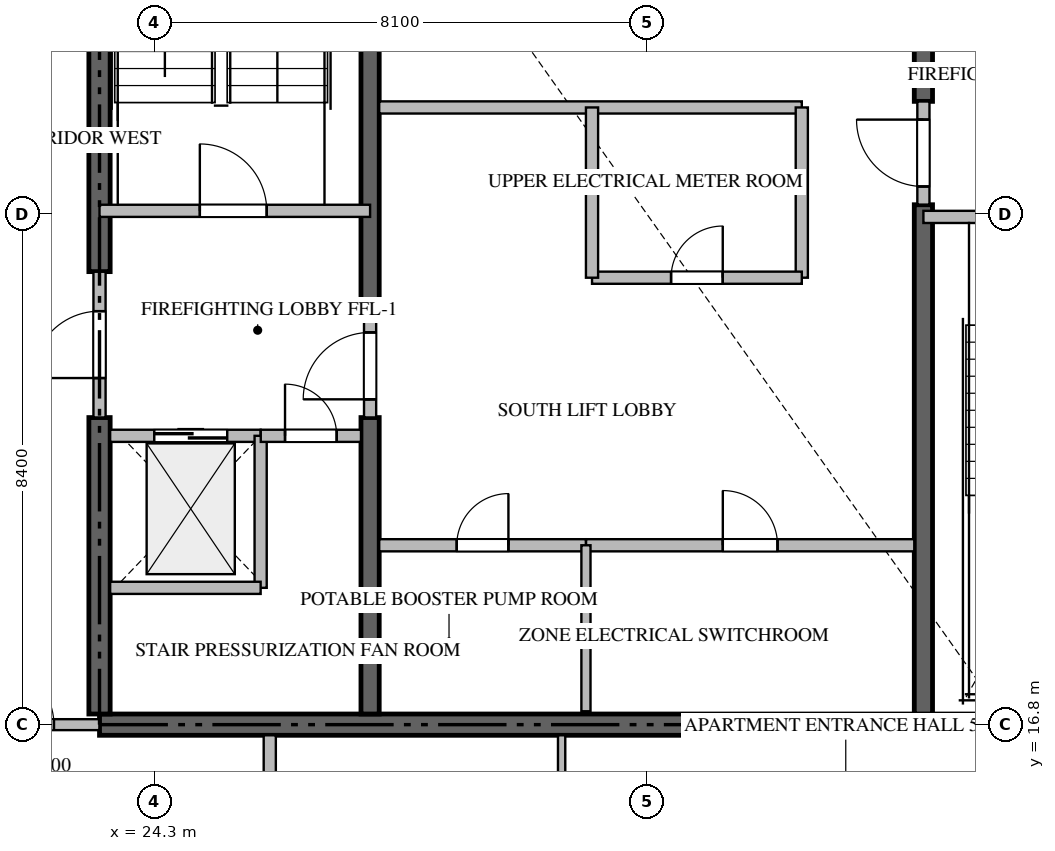
"""IFC4 building model, lengths in metres.
Left out: names, types, materials, properties, quantities, classifications, styles, units other than length and angle.
Written with IfcOpenShell. Run it as: python <this file> out.ifc"""

import sys

from ifc_helpers import new_model, si_unit, direction, frame, frame_2d, origin, place, context, subcontext, project, spatial, rectangle, extrude, source, transform, mapped, element, fill, save


model = new_model("IFC4")
c1 = context("Model", 3, precision=1e-05, world=origin(), true_north=direction((0.0, 1.0)))
c2 = subcontext(c1, "Body", "Model", "MODEL_VIEW")
j1 = project(units=[si_unit("LENGTHUNIT", "METRE"), si_unit("PLANEANGLEUNIT", "RADIAN")], contexts=[c1])
p1 = place(None, origin())
s1 = spatial("IfcSite", under=j1, at=p1, CompositionType="ELEMENT")
p2 = place(p1, origin())
s2 = spatial("IfcBuilding", under=s1, at=p2, CompositionType="ELEMENT")
p3 = place(p2, frame((0.0, 0.0, 222.0)))
s3 = spatial("IfcBuildingStorey", under=s2, at=p3, CompositionType="ELEMENT", Elevation=222.0)
p4 = place(p3, frame((23.4, 16.8, -0.26), z_axis=(0.0, 0.0, 1.0), x_axis=(1.0, 0.0, 0.0)))
e1 = element("IfcWall", 1, at=p4, inside=s3, PredefinedType="SHEAR", context=c2, shape_type="SweptSolid", body=[
    extrude(rectangle(XDim=18.0, YDim=0.35, at=frame_2d((9.0, 0.0))), origin(), (0.0, 0.0, 1.0), 3.848),
])
p5 = place(p3, frame((23.4, 16.975, -0.26), z_axis=(0.0, 0.0, 1.0), x_axis=(0.0, 1.0, 0.0)))
e2 = element("IfcWall", 2, at=p5, inside=s3, PredefinedType="SHEAR", context=c2, shape_type="SweptSolid", body=[
    extrude(rectangle(XDim=4.875, YDim=0.35, at=frame_2d((2.438, 0.0))), origin(), (0.0, 0.0, 1.0), 3.848),
])
p6 = place(p3, frame((23.4, 24.25, -0.26), z_axis=(0.0, 0.0, 1.0), x_axis=(0.0, 1.0, 0.0)))
e3 = element("IfcWall", 3, at=p6, inside=s3, PredefinedType="SHEAR", context=c2, shape_type="SweptSolid", body=[
    extrude(rectangle(XDim=9.175, YDim=0.35, at=frame_2d((4.587, 0.0))), origin(), (0.0, 0.0, 1.0), 3.848),
])
p7 = place(p3, frame((27.85, 16.975, -0.26), z_axis=(0.0, 0.0, 1.0), x_axis=(0.0, 1.0, 0.0)))
e4 = element("IfcWall", 4, at=p7, inside=s3, PredefinedType="SHEAR", context=c2, shape_type="SweptSolid", body=[
    extrude(rectangle(XDim=4.875, YDim=0.3, at=frame_2d((2.438, 0.0))), origin(), (0.0, 0.0, 1.0), 3.848),
])
p8 = place(p3, frame((27.85, 23.55, -0.26), z_axis=(0.0, 0.0, 1.0), x_axis=(0.0, 1.0, 0.0)))
e5 = element("IfcWall", 5, at=p8, inside=s3, PredefinedType="SHEAR", context=c2, shape_type="SweptSolid", body=[
    extrude(rectangle(XDim=9.875, YDim=0.3, at=frame_2d((4.938, 0.0))), origin(), (0.0, 0.0, 1.0), 3.848),
])
p9 = place(p3, frame((36.95, 16.975, -0.26), z_axis=(0.0, 0.0, 1.0), x_axis=(0.0, 1.0, 0.0)))
e6 = element("IfcWall", 6, at=p9, inside=s3, PredefinedType="SHEAR", context=c2, shape_type="SweptSolid", body=[
    extrude(rectangle(XDim=8.375, YDim=0.3, at=frame_2d((4.188, 0.0))), origin(), (0.0, 0.0, 1.0), 3.848),
])
p10 = place(p3, frame((36.95, 27.05, -0.26), z_axis=(0.0, 0.0, 1.0), x_axis=(0.0, 1.0, 0.0)))
e7 = element("IfcWall", 7, at=p10, inside=s3, PredefinedType="SHEAR", context=c2, shape_type="SweptSolid", body=[
    extrude(rectangle(XDim=6.375, YDim=0.3, at=frame_2d((3.188, 0.0))), origin(), (0.0, 0.0, 1.0), 3.848),
])
p11 = place(p3, frame((23.4, 25.25, 0.0), z_axis=(0.0, 0.0, 1.0), x_axis=(1.0, 0.0, 0.0)))
e8 = element("IfcWall", 8, at=p11, inside=s3, PredefinedType="STANDARD", context=c2, shape_type="SweptSolid", body=[
    extrude(rectangle(XDim=4.45, YDim=0.2, at=frame_2d((2.225, 0.0))), origin(), (0.0, 0.0, 1.0), 3.59),
])
p12 = place(p11, frame((1.65, 0.0, 0.0)))
e9 = element("IfcOpeningElement", 9, at=p12, cuts=e8, PredefinedType="OPENING", context=c2, shape_type="SweptSolid", body=[
    extrude(rectangle(XDim=1.1, YDim=2.15, at=frame_2d((0.55, 1.075))), frame((0.0, 0.11, 0.0), z_axis=(0.0, -1.0, 0.0), x_axis=(1.0, 0.0, 0.0)), (0.0, 0.0, 1.0), 0.22),
])
p13 = place(p3, frame((36.95, 25.15, 0.0), z_axis=(0.0, 0.0, 1.0), x_axis=(1.0, 0.0, 0.0)))
e10 = element("IfcWall", 10, at=p13, inside=s3, PredefinedType="STANDARD", context=c2, shape_type="SweptSolid", body=[
    extrude(rectangle(XDim=4.45, YDim=0.2, at=frame_2d((2.225, 0.0))), origin(), (0.0, 0.0, 1.0), 3.59),
])
p14 = place(p13, frame((1.65, 0.0, 0.0)))
e11 = element("IfcOpeningElement", 11, at=p14, cuts=e10, PredefinedType="OPENING", context=c2, shape_type="SweptSolid", body=[
    extrude(rectangle(XDim=1.1, YDim=2.15, at=frame_2d((0.55, 1.075))), frame((0.0, 0.11, 0.0), z_axis=(0.0, -1.0, 0.0), x_axis=(1.0, 0.0, 0.0)), (0.0, 0.0, 1.0), 0.22),
])
p15 = place(p3, frame((23.575, 21.55, 0.0), z_axis=(0.0, 0.0, 1.0), x_axis=(1.0, 0.0, 0.0)))
e12 = element("IfcWall", 12, at=p15, inside=s3, PredefinedType="STANDARD", context=c2, shape_type="SweptSolid", body=[
    extrude(rectangle(XDim=2.475, YDim=0.2, at=frame_2d((1.238, 0.0))), origin(), (0.0, 0.0, 1.0), 3.59),
])
p16 = place(p15, frame((0.725, 0.0, 0.0)))
e13 = element("IfcOpeningElement", 13, at=p16, cuts=e12, PredefinedType="OPENING", context=c2, shape_type="SweptSolid", body=[
    extrude(rectangle(XDim=1.2, YDim=2.2, at=frame_2d((0.6, 1.1))), frame((0.0, 0.11, 0.0), z_axis=(0.0, -1.0, 0.0), x_axis=(1.0, 0.0, 0.0)), (0.0, 0.0, 1.0), 0.22),
])
p17 = place(p3, frame((26.05, 19.05, 0.0), z_axis=(0.0, 0.0, 1.0), x_axis=(0.0, 1.0, 0.0)))
e14 = element("IfcWall", 14, at=p17, inside=s3, PredefinedType="STANDARD", context=c2, shape_type="SweptSolid", body=[
    extrude(rectangle(XDim=2.5, YDim=0.2, at=frame_2d((1.25, 0.0))), origin(), (0.0, 0.0, 1.0), 3.59),
])
p18 = place(p3, frame((23.575, 19.05, 0.0), z_axis=(0.0, 0.0, 1.0), x_axis=(1.0, 0.0, 0.0)))
e15 = element("IfcWall", 15, at=p18, inside=s3, PredefinedType="STANDARD", context=c2, shape_type="SweptSolid", body=[
    extrude(rectangle(XDim=2.475, YDim=0.2, at=frame_2d((1.238, 0.0))), origin(), (0.0, 0.0, 1.0), 3.59),
])
p19 = place(p3, frame((26.052, 21.55, 0.0), z_axis=(0.0, 0.0, 1.0), x_axis=(1.0, 0.0, 0.0)))
e16 = element("IfcWall", 16, at=p19, inside=s3, PredefinedType="STANDARD", context=c2, shape_type="SweptSolid", body=[
    extrude(rectangle(XDim=1.648, YDim=0.2, at=frame_2d((0.824, 0.0))), origin(), (0.0, 0.0, 1.0), 3.59),
])
p20 = place(p19, frame((0.399, 0.0, 0.0)))
e17 = element("IfcOpeningElement", 17, at=p20, cuts=e16, PredefinedType="OPENING", context=c2, shape_type="SweptSolid", body=[
    extrude(rectangle(XDim=0.85, YDim=2.1, at=frame_2d((0.425, 1.05))), frame((0.0, 0.11, 0.0), z_axis=(0.0, -1.0, 0.0), x_axis=(1.0, 0.0, 0.0)), (0.0, 0.0, 1.0), 0.22),
])
p21 = place(p3, frame((23.4, 21.852, 0.0), z_axis=(0.0, 0.0, 1.0), x_axis=(0.0, 1.0, 0.0)))
e18 = element("IfcWall", 18, at=p21, inside=s3, PredefinedType="STANDARD", context=c2, shape_type="SweptSolid", body=[
    extrude(rectangle(XDim=2.396, YDim=0.2, at=frame_2d((1.198, 0.0))), origin(), (0.0, 0.0, 1.0), 3.59),
])
p22 = place(p21, frame((0.648, 0.0, 0.0)))
e19 = element("IfcOpeningElement", 19, at=p22, cuts=e18, PredefinedType="OPENING", context=c2, shape_type="SweptSolid", body=[
    extrude(rectangle(XDim=1.1, YDim=2.15, at=frame_2d((0.55, 1.075))), frame((0.0, 0.11, 0.0), z_axis=(0.0, -1.0, 0.0), x_axis=(1.0, 0.0, 0.0)), (0.0, 0.0, 1.0), 0.22),
])
p23 = place(p3, frame((27.85, 21.852, 0.0), z_axis=(0.0, 0.0, 1.0), x_axis=(0.0, 1.0, 0.0)))
e20 = element("IfcWall", 20, at=p23, inside=s3, PredefinedType="STANDARD", context=c2, shape_type="SweptSolid", body=[
    extrude(rectangle(XDim=1.696, YDim=0.2, at=frame_2d((0.848, 0.0))), origin(), (0.0, 0.0, 1.0), 3.59),
])
p24 = place(p23, frame((0.298, 0.0, 0.0)))
e21 = element("IfcOpeningElement", 21, at=p24, cuts=e20, PredefinedType="OPENING", context=c2, shape_type="SweptSolid", body=[
    extrude(rectangle(XDim=1.1, YDim=2.15, at=frame_2d((0.55, 1.075))), frame((0.0, 0.11, 0.0), z_axis=(0.0, -1.0, 0.0), x_axis=(1.0, 0.0, 0.0)), (0.0, 0.0, 1.0), 0.22),
])
p25 = place(p3, frame((36.95, 25.352, 0.0), z_axis=(0.0, 0.0, 1.0), x_axis=(0.0, 1.0, 0.0)))
e22 = element("IfcWall", 22, at=p25, inside=s3, PredefinedType="STANDARD", context=c2, shape_type="SweptSolid", body=[
    extrude(rectangle(XDim=1.696, YDim=0.2, at=frame_2d((0.848, 0.0))), origin(), (0.0, 0.0, 1.0), 3.59),
])
p26 = place(p25, frame((0.298, 0.0, 0.0)))
e23 = element("IfcOpeningElement", 23, at=p26, cuts=e22, PredefinedType="OPENING", context=c2, shape_type="SweptSolid", body=[
    extrude(rectangle(XDim=1.1, YDim=2.15, at=frame_2d((0.55, 1.075))), frame((0.0, 0.11, 0.0), z_axis=(0.0, -1.0, 0.0), x_axis=(1.0, 0.0, 0.0)), (0.0, 0.0, 1.0), 0.22),
])
p27 = place(p3, frame((28.0, 19.75, 0.0), z_axis=(0.0, 0.0, 1.0), x_axis=(1.0, 0.0, 0.0)))
e24 = element("IfcWall", 24, at=p27, inside=s3, PredefinedType="STANDARD", context=c2, shape_type="SweptSolid", body=[
    extrude(rectangle(XDim=3.4, YDim=0.2, at=frame_2d((1.7, 0.0))), origin(), (0.0, 0.0, 1.0), 3.59),
])
p28 = place(p27, frame((1.275, 0.0, 0.0)))
e25 = element("IfcOpeningElement", 25, at=p28, cuts=e24, PredefinedType="OPENING", context=c2, shape_type="SweptSolid", body=[
    extrude(rectangle(XDim=0.85, YDim=2.1, at=frame_2d((0.425, 1.05))), frame((0.0, 0.11, 0.0), z_axis=(0.0, -1.0, 0.0), x_axis=(1.0, 0.0, 0.0)), (0.0, 0.0, 1.0), 0.22),
])
p29 = place(p3, frame((31.402, 19.75, 0.0), z_axis=(0.0, 0.0, 1.0), x_axis=(1.0, 0.0, 0.0)))
e26 = element("IfcWall", 26, at=p29, inside=s3, PredefinedType="STANDARD", context=c2, shape_type="SweptSolid", body=[
    extrude(rectangle(XDim=5.398, YDim=0.2, at=frame_2d((2.699, 0.0))), origin(), (0.0, 0.0, 1.0), 3.59),
])
p30 = place(p29, frame((2.249, 0.0, 0.0)))
e27 = element("IfcOpeningElement", 27, at=p30, cuts=e26, PredefinedType="OPENING", context=c2, shape_type="SweptSolid", body=[
    extrude(rectangle(XDim=0.9, YDim=2.1, at=frame_2d((0.45, 1.05))), frame((0.0, 0.11, 0.0), z_axis=(0.0, -1.0, 0.0), x_axis=(1.0, 0.0, 0.0)), (0.0, 0.0, 1.0), 0.22),
])
p31 = place(p3, frame((31.4, 17.02, 0.0), z_axis=(0.0, 0.0, 1.0), x_axis=(0.0, 1.0, 0.0)))
e28 = element("IfcWall", 28, at=p31, inside=s3, PredefinedType="PARTITIONING", context=c2, shape_type="SweptSolid", body=[
    extrude(rectangle(XDim=2.73, YDim=0.15, at=frame_2d((1.365, 0.0))), origin(), (0.0, 0.0, 1.0), 3.59),
])
p32 = place(p3, frame((28.0, 26.95, 0.0), z_axis=(0.0, 0.0, 1.0), x_axis=(1.0, 0.0, 0.0)))
e29 = element("IfcWall", 29, at=p32, inside=s3, PredefinedType="STANDARD", context=c2, shape_type="SweptSolid", body=[
    extrude(rectangle(XDim=6.95, YDim=0.2, at=frame_2d((3.475, 0.0))), origin(), (0.0, 0.0, 1.0), 3.59),
])
p33 = place(p3, frame((34.95, 24.15, 0.0), z_axis=(0.0, 0.0, 1.0), x_axis=(0.0, 1.0, 0.0)))
e30 = element("IfcWall", 30, at=p33, inside=s3, PredefinedType="STANDARD", context=c2, shape_type="SweptSolid", body=[
    extrude(rectangle(XDim=2.8, YDim=0.2, at=frame_2d((1.4, 0.0))), origin(), (0.0, 0.0, 1.0), 3.59),
])
p34 = place(p3, frame((31.5, 24.15, 0.0), z_axis=(0.0, 0.0, 1.0), x_axis=(1.0, 0.0, 0.0)))
e31 = element("IfcWall", 31, at=p34, inside=s3, PredefinedType="STANDARD", context=c2, shape_type="SweptSolid", body=[
    extrude(rectangle(XDim=3.45, YDim=0.2, at=frame_2d((1.725, 0.0))), origin(), (0.0, 0.0, 1.0), 3.59),
])
p35 = place(p34, frame((1.3, 0.0, 0.0)))
e32 = element("IfcOpeningElement", 32, at=p35, cuts=e31, PredefinedType="OPENING", context=c2, shape_type="SweptSolid", body=[
    extrude(rectangle(XDim=0.85, YDim=2.1, at=frame_2d((0.425, 1.05))), frame((0.0, 0.11, 0.0), z_axis=(0.0, -1.0, 0.0), x_axis=(1.0, 0.0, 0.0)), (0.0, 0.0, 1.0), 0.22),
])
p36 = place(p3, frame((31.5, 24.15, 0.0), z_axis=(0.0, 0.0, 1.0), x_axis=(0.0, 1.0, 0.0)))
e33 = element("IfcWall", 33, at=p36, inside=s3, PredefinedType="STANDARD", context=c2, shape_type="SweptSolid", body=[
    extrude(rectangle(XDim=2.8, YDim=0.2, at=frame_2d((1.4, 0.0))), origin(), (0.0, 0.0, 1.0), 3.59),
])
p37 = place(p3, frame((26.2, 1.282, 0.0), z_axis=(0.0, 0.0, 1.0), x_axis=(0.0, 1.0, 0.0)))
e34 = element("IfcWall", 34, at=p37, inside=s3, PredefinedType="PARTITIONING", context=c2, shape_type="SweptSolid", body=[
    extrude(rectangle(XDim=15.343, YDim=0.2, at=frame_2d((7.671, 0.0))), origin(), (0.0, 0.0, 1.0), 3.59),
])
p38 = place(p3, frame((20.902, 16.8, 0.0), z_axis=(0.0, 0.0, 1.0), x_axis=(1.0, 0.0, 0.0)))
e35 = element("IfcWall", 35, at=p38, inside=s3, PredefinedType="PARTITIONING", context=c2, shape_type="SweptSolid", body=[
    extrude(rectangle(XDim=2.496, YDim=0.18, at=frame_2d((1.248, 0.0))), origin(), (0.0, 0.0, 1.0), 3.59),
])
p39 = place(p38, frame((0.748, 0.0, 0.0)))
e36 = element("IfcOpeningElement", 36, at=p39, cuts=e35, PredefinedType="OPENING", context=c2, shape_type="SweptSolid", body=[
    extrude(rectangle(XDim=1.0, YDim=2.15, at=frame_2d((0.5, 1.075))), frame((0.0, 0.1, 0.0), z_axis=(0.0, -1.0, 0.0), x_axis=(1.0, 0.0, 0.0)), (0.0, 0.0, 1.0), 0.2),
])
p40 = place(p3, frame((31.0, 14.652, 0.0), z_axis=(0.0, 0.0, 1.0), x_axis=(0.0, 1.0, 0.0)))
e37 = element("IfcWall", 37, at=p40, inside=s3, PredefinedType="PARTITIONING", context=c2, shape_type="SweptSolid", body=[
    extrude(rectangle(XDim=1.973, YDim=0.12, at=frame_2d((0.986, 0.0))), origin(), (0.0, 0.0, 1.0), 3.59),
])
m1 = source(origin(), c2, "Body", "SweptSolid", [
    extrude(rectangle(XDim=1.1, YDim=2.15, at=frame_2d((0.55, 1.075))), frame((0.0, 0.025, 0.0), z_axis=(0.0, -1.0, 0.0), x_axis=(1.0, 0.0, 0.0)), (0.0, 0.0, 1.0), 0.05),
])
p41 = place(p12, origin())
e38 = element("IfcDoor", 38, at=p41, inside=s3, OperationType="SINGLE_SWING_LEFT", PredefinedType="DOOR", context=c2, shape_type="MappedRepresentation", body=[
    mapped(m1, transform((0.0, 0.0, 0.0), scale=1.0)),
])
fill(e9, e38)
m2 = source(origin(), c2, "Body", "SweptSolid", [
    extrude(rectangle(XDim=1.2, YDim=2.2, at=frame_2d((0.6, 1.1))), frame((0.0, 0.025, 0.0), z_axis=(0.0, -1.0, 0.0), x_axis=(1.0, 0.0, 0.0)), (0.0, 0.0, 1.0), 0.05),
])
p42 = place(p16, origin())
e39 = element("IfcDoor", 39, at=p42, inside=s3, OperationType="DOUBLE_DOOR_SLIDING", PredefinedType="DOOR", context=c2, shape_type="MappedRepresentation", body=[
    mapped(m2, transform((0.0, 0.0, 0.0), scale=1.0)),
])
fill(e13, e39)
m3 = source(origin(), c2, "Body", "SweptSolid", [
    extrude(rectangle(XDim=0.85, YDim=2.1, at=frame_2d((0.425, 1.05))), frame((0.0, 0.025, 0.0), z_axis=(0.0, -1.0, 0.0), x_axis=(1.0, 0.0, 0.0)), (0.0, 0.0, 1.0), 0.05),
])
p43 = place(p20, origin())
e40 = element("IfcDoor", 40, at=p43, inside=s3, OperationType="SINGLE_SWING_LEFT", PredefinedType="DOOR", context=c2, shape_type="MappedRepresentation", body=[
    mapped(m3, transform((0.0, 0.0, 0.0), scale=1.0)),
])
fill(e17, e40)
p44 = place(p22, origin())
e41 = element("IfcDoor", 41, at=p44, inside=s3, OperationType="SINGLE_SWING_LEFT", PredefinedType="DOOR", context=c2, shape_type="MappedRepresentation", body=[
    mapped(m1, transform((0.0, 0.0, 0.0), scale=1.0)),
])
fill(e19, e41)
p45 = place(p24, origin())
e42 = element("IfcDoor", 42, at=p45, inside=s3, OperationType="SINGLE_SWING_LEFT", PredefinedType="DOOR", context=c2, shape_type="MappedRepresentation", body=[
    mapped(m1, transform((0.0, 0.0, 0.0), scale=1.0)),
])
fill(e21, e42)
p46 = place(p26, origin())
e43 = element("IfcDoor", 43, at=p46, inside=s3, OperationType="SINGLE_SWING_RIGHT", PredefinedType="DOOR", context=c2, shape_type="MappedRepresentation", body=[
    mapped(m1, transform((0.0, 0.0, 0.0), scale=1.0)),
])
fill(e23, e43)
p47 = place(p28, origin())
e44 = element("IfcDoor", 44, at=p47, inside=s3, OperationType="SINGLE_SWING_RIGHT", PredefinedType="DOOR", context=c2, shape_type="MappedRepresentation", body=[
    mapped(m3, transform((0.0, 0.0, 0.0), scale=1.0)),
])
fill(e25, e44)
m4 = source(origin(), c2, "Body", "SweptSolid", [
    extrude(rectangle(XDim=0.9, YDim=2.1, at=frame_2d((0.45, 1.05))), frame((0.0, 0.025, 0.0), z_axis=(0.0, -1.0, 0.0), x_axis=(1.0, 0.0, 0.0)), (0.0, 0.0, 1.0), 0.05),
])
p48 = place(p30, origin())
e45 = element("IfcDoor", 45, at=p48, inside=s3, OperationType="SINGLE_SWING_LEFT", PredefinedType="DOOR", context=c2, shape_type="MappedRepresentation", body=[
    mapped(m4, transform((0.0, 0.0, 0.0), scale=1.0)),
])
fill(e27, e45)
p49 = place(p35, origin())
e46 = element("IfcDoor", 46, at=p49, inside=s3, OperationType="SINGLE_SWING_RIGHT", PredefinedType="DOOR", context=c2, shape_type="MappedRepresentation", body=[
    mapped(m3, transform((0.0, 0.0, 0.0), scale=1.0)),
])
fill(e32, e46)
m5 = source(origin(), c2, "Body", "SweptSolid", [
    extrude(rectangle(XDim=1.0, YDim=2.15, at=frame_2d((0.5, 1.075))), frame((0.0, 0.025, 0.0), z_axis=(0.0, -1.0, 0.0), x_axis=(1.0, 0.0, 0.0)), (0.0, 0.0, 1.0), 0.05),
])
p50 = place(p39, origin())
e47 = element("IfcDoor", 47, at=p50, inside=s3, OperationType="SINGLE_SWING_LEFT", PredefinedType="DOOR", context=c2, shape_type="MappedRepresentation", body=[
    mapped(m5, transform((0.0, 0.0, 0.0), scale=1.0)),
])
fill(e36, e47)
save(model, sys.argv[1])
